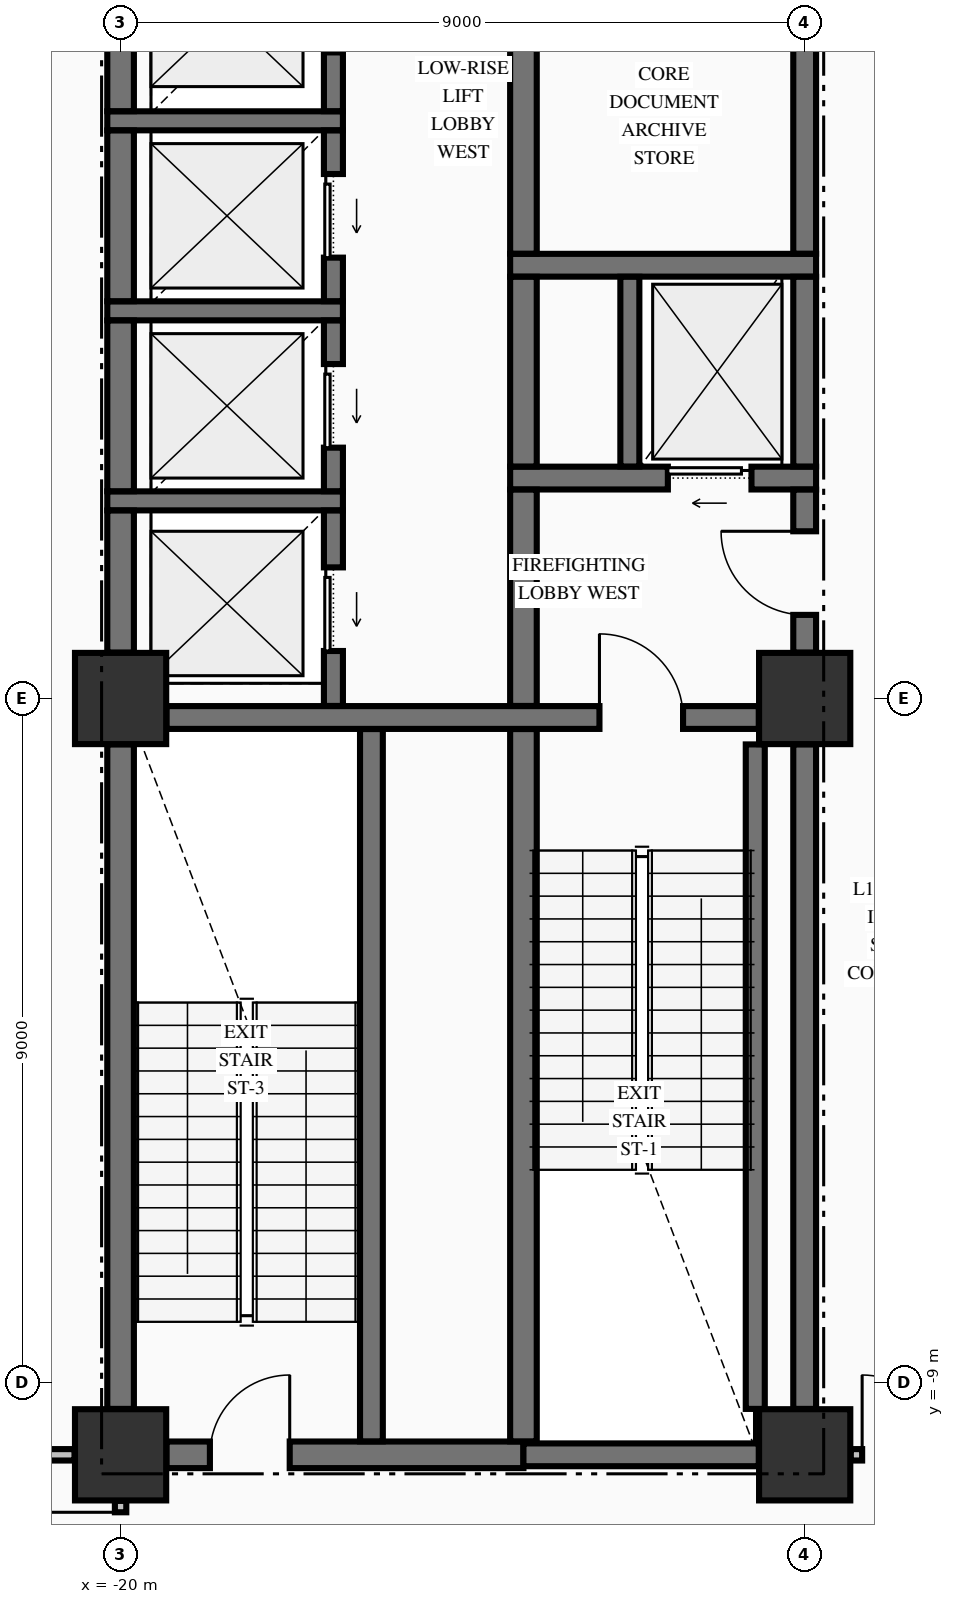
"""IFC4 building model, lengths in metres.
Left out: names, types, materials, properties, quantities, classifications, styles, units other than length and angle.
Written with IfcOpenShell. Run it as: python <this file> out.ifc"""

import sys

from ifc_helpers import new_model, si_unit, direction, frame, frame_2d, origin, origin_2d, place, context, subcontext, project, spatial, rectangle, extrude, element, fill, save


model = new_model("IFC4")
c1 = context("Model", 3, precision=1e-05, world=origin(), true_north=direction((0.0, 1.0)))
c2 = subcontext(c1, "Body", "Model", "MODEL_VIEW")
j1 = project(units=[si_unit("LENGTHUNIT", "METRE"), si_unit("PLANEANGLEUNIT", "RADIAN")], contexts=[c1])
p1 = place(None, origin())
s1 = spatial("IfcSite", under=j1, at=p1, CompositionType="ELEMENT")
p2 = place(p1, origin())
s2 = spatial("IfcBuilding", under=s1, at=p2, CompositionType="ELEMENT")
p3 = place(p2, frame((0.0, 0.0, 52.19)))
s3 = spatial("IfcBuildingStorey", under=s2, at=p3, CompositionType="ELEMENT", Elevation=52.19)
for number, where, z_axis, x_axis in (
    (1, (-20.0, -9.95, -0.425), (0.0, 0.0, 1.0), (1.0, 0.0, 0.0)),
    (2, (-11.0, -9.95, -0.425), (0.0, 0.0, 1.0), (1.0, 0.0, 0.0)),
    (3, (-11.0, 0.0, -0.425), (0.0, 0.0, 1.0), (1.0, 0.0, 0.0)),
    (4, (-20.0, 0.0, -0.425), (0.0, 0.0, 1.0), (1.0, 0.0, 0.0)),
):
    element("IfcColumn", number, at=place(p3, frame(where, z_axis=z_axis, x_axis=x_axis)), inside=s3, PredefinedType="COLUMN", context=c2, shape_type="SweptSolid", body=[
        extrude(rectangle(XDim=1.2, YDim=1.2, at=origin_2d()), origin(), (0.0, 0.0, 1.0), 5.0),
    ])
p4 = place(p3, frame((-19.396, -9.95, 0.0), z_axis=(0.0, 0.0, 1.0), x_axis=(1.0, 0.0, 0.0)))
e5 = element("IfcWall", 5, at=p4, inside=s3, PredefinedType="SHEAR", context=c2, shape_type="SweptSolid", body=[
    extrude(rectangle(XDim=4.696, YDim=0.35, at=frame_2d((2.348, 0.0))), origin(), (0.0, 0.0, 1.0), 4.575),
])
p5 = place(p4, frame((0.571, 0.0, 0.0)))
e6 = element("IfcOpeningElement", 6, at=p5, cuts=e5, PredefinedType="OPENING", context=c2, shape_type="SweptSolid", body=[
    extrude(rectangle(XDim=1.05, YDim=2.15, at=frame_2d((0.525, 1.075))), frame((0.0, 0.185, 0.0), z_axis=(0.0, -1.0, 0.0), x_axis=(1.0, 0.0, 0.0)), (0.0, 0.0, 1.0), 0.37),
])
p6 = place(p3, frame((-14.7, -9.95, 0.0), z_axis=(0.0, 0.0, 1.0), x_axis=(1.0, 0.0, 0.0)))
e7 = element("IfcWall", 7, at=p6, inside=s3, PredefinedType="SHEAR", context=c2, shape_type="SweptSolid", body=[
    extrude(rectangle(XDim=3.096, YDim=0.3, at=frame_2d((1.548, 0.0))), origin(), (0.0, 0.0, 1.0), 4.575),
])
p7 = place(p3, frame((-19.396, -0.25, 0.0), z_axis=(0.0, 0.0, 1.0), x_axis=(1.0, 0.0, 0.0)))
e8 = element("IfcWall", 8, at=p7, inside=s3, PredefinedType="SHEAR", context=c2, shape_type="SweptSolid", body=[
    extrude(rectangle(XDim=7.792, YDim=0.3, at=frame_2d((3.896, 0.0))), origin(), (0.0, 0.0, 1.0), 4.575),
])
p8 = place(p7, frame((5.696, 0.0, 0.0)))
e9 = element("IfcOpeningElement", 9, at=p8, cuts=e8, PredefinedType="OPENING", context=c2, shape_type="SweptSolid", body=[
    extrude(rectangle(XDim=1.1, YDim=2.15, at=frame_2d((0.55, 1.075))), frame((0.0, 0.16, 0.0), z_axis=(0.0, -1.0, 0.0), x_axis=(1.0, 0.0, 0.0)), (0.0, 0.0, 1.0), 0.32),
])
p9 = place(p3, frame((-20.175, 2.6, 0.0), z_axis=(0.0, 0.0, 1.0), x_axis=(1.0, 0.0, 0.0)))
e10 = element("IfcWall", 10, at=p9, inside=s3, PredefinedType="SOLIDWALL", context=c2, shape_type="SweptSolid", body=[
    extrude(rectangle(XDim=3.1, YDim=0.25, at=frame_2d((1.55, 0.0))), origin(), (0.0, 0.0, 1.0), 4.575),
])
p10 = place(p3, frame((-14.875, 2.9, 0.0), z_axis=(0.0, 0.0, 1.0), x_axis=(1.0, 0.0, 0.0)))
e11 = element("IfcWall", 11, at=p10, inside=s3, PredefinedType="SHEAR", context=c2, shape_type="SweptSolid", body=[
    extrude(rectangle(XDim=4.025, YDim=0.3, at=frame_2d((2.012, 0.0))), origin(), (0.0, 0.0, 1.0), 4.575),
])
p11 = place(p10, frame((2.075, 0.0, 0.0)))
e12 = element("IfcOpeningElement", 12, at=p11, cuts=e11, PredefinedType="OPENING", context=c2, shape_type="SweptSolid", body=[
    extrude(rectangle(XDim=1.1, YDim=2.2, at=frame_2d((0.55, 1.1))), frame((0.0, 0.16, 0.0), z_axis=(0.0, -1.0, 0.0), x_axis=(1.0, 0.0, 0.0)), (0.0, 0.0, 1.0), 0.32),
])
p12 = place(p3, frame((-20.175, 5.1, 0.0), z_axis=(0.0, 0.0, 1.0), x_axis=(1.0, 0.0, 0.0)))
e13 = element("IfcWall", 13, at=p12, inside=s3, PredefinedType="SOLIDWALL", context=c2, shape_type="SweptSolid", body=[
    extrude(rectangle(XDim=3.1, YDim=0.25, at=frame_2d((1.55, 0.0))), origin(), (0.0, 0.0, 1.0), 4.575),
])
p13 = place(p3, frame((-14.875, 5.7, 0.0), z_axis=(0.0, 0.0, 1.0), x_axis=(1.0, 0.0, 0.0)))
e14 = element("IfcWall", 14, at=p13, inside=s3, PredefinedType="SHEAR", context=c2, shape_type="SweptSolid", body=[
    extrude(rectangle(XDim=4.025, YDim=0.3, at=frame_2d((2.012, 0.0))), origin(), (0.0, 0.0, 1.0), 4.575),
])
p14 = place(p3, frame((-20.175, 7.6, 0.0), z_axis=(0.0, 0.0, 1.0), x_axis=(1.0, 0.0, 0.0)))
e15 = element("IfcWall", 15, at=p14, inside=s3, PredefinedType="SOLIDWALL", context=c2, shape_type="SweptSolid", body=[
    extrude(rectangle(XDim=3.1, YDim=0.25, at=frame_2d((1.55, 0.0))), origin(), (0.0, 0.0, 1.0), 4.575),
])
p15 = place(p3, frame((-23.835, -9.95, 0.0), z_axis=(0.0, 0.0, 1.0), x_axis=(1.0, 0.0, 0.0)))
e16 = element("IfcWall", 16, at=p15, inside=s3, PredefinedType="PARTITIONING", context=c2, shape_type="SweptSolid", body=[
    extrude(rectangle(XDim=3.229, YDim=0.15, at=frame_2d((1.615, 0.0))), origin(), (0.0, 0.0, 1.0), 4.575),
])
p16 = place(p15, frame((1.335, 0.0, 0.0)))
e17 = element("IfcOpeningElement", 17, at=p16, cuts=e16, PredefinedType="OPENING", context=c2, shape_type="SweptSolid", body=[
    extrude(rectangle(XDim=1.0, YDim=2.15, at=frame_2d((0.5, 1.075))), frame((0.0, 0.085, 0.0), z_axis=(0.0, -1.0, 0.0), x_axis=(1.0, 0.0, 0.0)), (0.0, 0.0, 1.0), 0.17),
])
p17 = place(p3, frame((-10.394, -9.95, 0.0), z_axis=(0.0, 0.0, 1.0), x_axis=(1.0, 0.0, 0.0)))
e18 = element("IfcWall", 18, at=p17, inside=s3, PredefinedType="PARTITIONING", context=c2, shape_type="SweptSolid", body=[
    extrude(rectangle(XDim=20.788, YDim=0.15, at=frame_2d((10.394, 0.0))), origin(), (0.0, 0.0, 1.0), 4.575),
])
p18 = place(p17, frame((0.15, 0.0, 0.0)))
e19 = element("IfcOpeningElement", 19, at=p18, cuts=e18, PredefinedType="OPENING", context=c2, shape_type="SweptSolid", body=[
    extrude(rectangle(XDim=1.05, YDim=2.15, at=frame_2d((0.525, 1.075))), frame((0.0, 0.085, 0.0), z_axis=(0.0, -1.0, 0.0), x_axis=(1.0, 0.0, 0.0)), (0.0, 0.0, 1.0), 0.17),
])
p19 = place(p17, frame((19.588, 0.0, 0.0)))
e20 = element("IfcOpeningElement", 20, at=p19, cuts=e18, PredefinedType="OPENING", context=c2, shape_type="SweptSolid", body=[
    extrude(rectangle(XDim=1.05, YDim=2.15, at=frame_2d((0.525, 1.075))), frame((0.0, 0.085, 0.0), z_axis=(0.0, -1.0, 0.0), x_axis=(1.0, 0.0, 0.0)), (0.0, 0.0, 1.0), 0.17),
])
p20 = place(p17, frame((12.669, 0.0, 0.0)))
e21 = element("IfcOpeningElement", 21, at=p20, cuts=e18, PredefinedType="OPENING", context=c2, shape_type="SweptSolid", body=[
    extrude(rectangle(XDim=0.95, YDim=2.15, at=frame_2d((0.475, 1.075))), frame((0.0, 0.085, 0.0), z_axis=(0.0, -1.0, 0.0), x_axis=(1.0, 0.0, 0.0)), (0.0, 0.0, 1.0), 0.17),
])
p21 = place(p3, frame((-20.0, -9.346, 0.0), z_axis=(0.0, 0.0, 1.0), x_axis=(0.0, 1.0, 0.0)))
e22 = element("IfcWall", 22, at=p21, inside=s3, PredefinedType="SHEAR", context=c2, shape_type="SweptSolid", body=[
    extrude(rectangle(XDim=8.742, YDim=0.35, at=frame_2d((4.371, 0.0))), origin(), (0.0, 0.0, 1.0), 4.575),
])
p22 = place(p3, frame((-20.0, 0.604, 0.0), z_axis=(0.0, 0.0, 1.0), x_axis=(0.0, 1.0, 0.0)))
e23 = element("IfcWall", 23, at=p22, inside=s3, PredefinedType="SHEAR", context=c2, shape_type="SweptSolid", body=[
    extrude(rectangle(XDim=1.869, YDim=0.35, at=frame_2d((0.935, 0.0))), origin(), (0.0, 0.0, 1.0), 4.575),
])
for number, where, z_axis, x_axis in (
    (24, (-20.0, 2.727, 0.0), (0.0, 0.0, 1.0), (0.0, 1.0, 0.0)),
    (25, (-20.0, 5.227, 0.0), (0.0, 0.0, 1.0), (0.0, 1.0, 0.0)),
):
    element("IfcWall", number, at=place(p3, frame(where, z_axis=z_axis, x_axis=x_axis)), inside=s3, PredefinedType="SHEAR", context=c2, shape_type="SweptSolid", body=[
        extrude(rectangle(XDim=2.246, YDim=0.35, at=frame_2d((1.123, 0.0))), origin(), (0.0, 0.0, 1.0), 4.575),
    ])
p23 = place(p3, frame((-20.0, 7.727, 0.0), z_axis=(0.0, 0.0, 1.0), x_axis=(0.0, 1.0, 0.0)))
e26 = element("IfcWall", 26, at=p23, inside=s3, PredefinedType="SHEAR", context=c2, shape_type="SweptSolid", body=[
    extrude(rectangle(XDim=2.169, YDim=0.35, at=frame_2d((1.084, 0.0))), origin(), (0.0, 0.0, 1.0), 4.575),
])
p24 = place(p3, frame((-17.2, -0.098, 0.0), z_axis=(0.0, 0.0, 1.0), x_axis=(0.0, 1.0, 0.0)))
e27 = element("IfcWall", 27, at=p24, inside=s3, PredefinedType="SOLIDWALL", context=c2, shape_type="SweptSolid", body=[
    extrude(rectangle(XDim=2.571, YDim=0.25, at=frame_2d((1.285, 0.0))), origin(), (0.0, 0.0, 1.0), 4.575),
])
p25 = place(p24, frame((0.723, 0.0, 0.0)))
e28 = element("IfcOpeningElement", 28, at=p25, cuts=e27, PredefinedType="OPENING", context=c2, shape_type="SweptSolid", body=[
    extrude(rectangle(XDim=1.1, YDim=2.2, at=frame_2d((0.55, 1.1))), frame((0.0, 0.135, 0.0), z_axis=(0.0, -1.0, 0.0), x_axis=(1.0, 0.0, 0.0)), (0.0, 0.0, 1.0), 0.27),
])
p26 = place(p3, frame((-17.2, 2.727, 0.0), z_axis=(0.0, 0.0, 1.0), x_axis=(0.0, 1.0, 0.0)))
e29 = element("IfcWall", 29, at=p26, inside=s3, PredefinedType="SOLIDWALL", context=c2, shape_type="SweptSolid", body=[
    extrude(rectangle(XDim=2.246, YDim=0.25, at=frame_2d((1.123, 0.0))), origin(), (0.0, 0.0, 1.0), 4.575),
])
p27 = place(p26, frame((0.573, 0.0, 0.0)))
e30 = element("IfcOpeningElement", 30, at=p27, cuts=e29, PredefinedType="OPENING", context=c2, shape_type="SweptSolid", body=[
    extrude(rectangle(XDim=1.1, YDim=2.2, at=frame_2d((0.55, 1.1))), frame((0.0, 0.135, 0.0), z_axis=(0.0, -1.0, 0.0), x_axis=(1.0, 0.0, 0.0)), (0.0, 0.0, 1.0), 0.27),
])
p28 = place(p3, frame((-17.2, 5.227, 0.0), z_axis=(0.0, 0.0, 1.0), x_axis=(0.0, 1.0, 0.0)))
e31 = element("IfcWall", 31, at=p28, inside=s3, PredefinedType="SOLIDWALL", context=c2, shape_type="SweptSolid", body=[
    extrude(rectangle(XDim=2.246, YDim=0.25, at=frame_2d((1.123, 0.0))), origin(), (0.0, 0.0, 1.0), 4.575),
])
p29 = place(p28, frame((0.573, 0.0, 0.0)))
e32 = element("IfcOpeningElement", 32, at=p29, cuts=e31, PredefinedType="OPENING", context=c2, shape_type="SweptSolid", body=[
    extrude(rectangle(XDim=1.1, YDim=2.2, at=frame_2d((0.55, 1.1))), frame((0.0, 0.135, 0.0), z_axis=(0.0, -1.0, 0.0), x_axis=(1.0, 0.0, 0.0)), (0.0, 0.0, 1.0), 0.27),
])
p30 = place(p3, frame((-17.2, 7.727, 0.0), z_axis=(0.0, 0.0, 1.0), x_axis=(0.0, 1.0, 0.0)))
e33 = element("IfcWall", 33, at=p30, inside=s3, PredefinedType="SOLIDWALL", context=c2, shape_type="SweptSolid", body=[
    extrude(rectangle(XDim=2.596, YDim=0.25, at=frame_2d((1.298, 0.0))), origin(), (0.0, 0.0, 1.0), 4.575),
])
p31 = place(p30, frame((0.773, 0.0, 0.0)))
e34 = element("IfcOpeningElement", 34, at=p31, cuts=e33, PredefinedType="OPENING", context=c2, shape_type="SweptSolid", body=[
    extrude(rectangle(XDim=1.1, YDim=2.2, at=frame_2d((0.55, 1.1))), frame((0.0, 0.135, 0.0), z_axis=(0.0, -1.0, 0.0), x_axis=(1.0, 0.0, 0.0)), (0.0, 0.0, 1.0), 0.27),
])
p32 = place(p3, frame((-16.7, -9.773, 0.0), z_axis=(0.0, 0.0, 1.0), x_axis=(0.0, 1.0, 0.0)))
e35 = element("IfcWall", 35, at=p32, inside=s3, PredefinedType="SHEAR", context=c2, shape_type="SweptSolid", body=[
    extrude(rectangle(XDim=9.371, YDim=0.3, at=frame_2d((4.686, 0.0))), origin(), (0.0, 0.0, 1.0), 4.575),
])
p33 = place(p3, frame((-14.7, -9.773, 0.0), z_axis=(0.0, 0.0, 1.0), x_axis=(0.0, 1.0, 0.0)))
e36 = element("IfcWall", 36, at=p33, inside=s3, PredefinedType="SHEAR", context=c2, shape_type="SweptSolid", body=[
    extrude(rectangle(XDim=9.371, YDim=0.35, at=frame_2d((4.686, 0.0))), origin(), (0.0, 0.0, 1.0), 4.575),
])
p34 = place(p3, frame((-14.7, -0.098, 0.0), z_axis=(0.0, 0.0, 1.0), x_axis=(0.0, 1.0, 0.0)))
e37 = element("IfcWall", 37, at=p34, inside=s3, PredefinedType="SHEAR", context=c2, shape_type="SweptSolid", body=[
    extrude(rectangle(XDim=2.846, YDim=0.35, at=frame_2d((1.423, 0.0))), origin(), (0.0, 0.0, 1.0), 4.575),
])
p35 = place(p3, frame((-14.7, 3.052, 0.0), z_axis=(0.0, 0.0, 1.0), x_axis=(0.0, 1.0, 0.0)))
e38 = element("IfcWall", 38, at=p35, inside=s3, PredefinedType="SHEAR", context=c2, shape_type="SweptSolid", body=[
    extrude(rectangle(XDim=2.496, YDim=0.35, at=frame_2d((1.248, 0.0))), origin(), (0.0, 0.0, 1.0), 4.575),
])
p36 = place(p3, frame((-14.7, 5.852, 0.0), z_axis=(0.0, 0.0, 1.0), x_axis=(0.0, 1.0, 0.0)))
e39 = element("IfcWall", 39, at=p36, inside=s3, PredefinedType="SHEAR", context=c2, shape_type="SweptSolid", body=[
    extrude(rectangle(XDim=4.471, YDim=0.35, at=frame_2d((2.235, 0.0))), origin(), (0.0, 0.0, 1.0), 4.575),
])
p37 = place(p3, frame((-13.3, 3.052, 0.0), z_axis=(0.0, 0.0, 1.0), x_axis=(0.0, 1.0, 0.0)))
e40 = element("IfcWall", 40, at=p37, inside=s3, PredefinedType="SOLIDWALL", context=c2, shape_type="SweptSolid", body=[
    extrude(rectangle(XDim=2.496, YDim=0.25, at=frame_2d((1.248, 0.0))), origin(), (0.0, 0.0, 1.0), 4.575),
])
p38 = place(p3, frame((-11.65, -9.346, 0.0), z_axis=(0.0, 0.0, 1.0), x_axis=(0.0, 1.0, 0.0)))
e41 = element("IfcWall", 41, at=p38, inside=s3, PredefinedType="SOLIDWALL", context=c2, shape_type="SweptSolid", body=[
    extrude(rectangle(XDim=8.742, YDim=0.25, at=frame_2d((4.371, 0.0))), origin(), (0.0, 0.0, 1.0), 4.575),
])
p39 = place(p3, frame((-11.0, -9.346, 0.0), z_axis=(0.0, 0.0, 1.0), x_axis=(0.0, 1.0, 0.0)))
e42 = element("IfcWall", 42, at=p39, inside=s3, PredefinedType="SHEAR", context=c2, shape_type="SweptSolid", body=[
    extrude(rectangle(XDim=8.742, YDim=0.3, at=frame_2d((4.371, 0.0))), origin(), (0.0, 0.0, 1.0), 4.575),
])
p40 = place(p3, frame((-11.0, 0.604, 0.0), z_axis=(0.0, 0.0, 1.0), x_axis=(0.0, 1.0, 0.0)))
e43 = element("IfcWall", 43, at=p40, inside=s3, PredefinedType="SHEAR", context=c2, shape_type="SweptSolid", body=[
    extrude(rectangle(XDim=2.144, YDim=0.3, at=frame_2d((1.072, 0.0))), origin(), (0.0, 0.0, 1.0), 4.575),
])
p41 = place(p40, frame((0.496, 0.0, 0.0)))
e44 = element("IfcOpeningElement", 44, at=p41, cuts=e43, PredefinedType="OPENING", context=c2, shape_type="SweptSolid", body=[
    extrude(rectangle(XDim=1.1, YDim=2.15, at=frame_2d((0.55, 1.075))), frame((0.0, 0.16, 0.0), z_axis=(0.0, -1.0, 0.0), x_axis=(1.0, 0.0, 0.0)), (0.0, 0.0, 1.0), 0.32),
])
p42 = place(p3, frame((-11.0, 3.052, 0.0), z_axis=(0.0, 0.0, 1.0), x_axis=(0.0, 1.0, 0.0)))
e45 = element("IfcWall", 45, at=p42, inside=s3, PredefinedType="SHEAR", context=c2, shape_type="SweptSolid", body=[
    extrude(rectangle(XDim=2.496, YDim=0.3, at=frame_2d((1.248, 0.0))), origin(), (0.0, 0.0, 1.0), 4.575),
])
p43 = place(p3, frame((-11.0, 5.852, 0.0), z_axis=(0.0, 0.0, 1.0), x_axis=(0.0, 1.0, 0.0)))
e46 = element("IfcWall", 46, at=p43, inside=s3, PredefinedType="SHEAR", context=c2, shape_type="SweptSolid", body=[
    extrude(rectangle(XDim=4.044, YDim=0.3, at=frame_2d((2.022, 0.0))), origin(), (0.0, 0.0, 1.0), 4.575),
])
p44 = place(p3, frame((-20.0, -12.222, 0.0), z_axis=(0.0, 0.0, 1.0), x_axis=(0.0, 1.0, 0.0)))
e47 = element("IfcWall", 47, at=p44, inside=s3, PredefinedType="PARTITIONING", context=c2, shape_type="SweptSolid", body=[
    extrude(rectangle(XDim=1.666, YDim=0.15, at=frame_2d((0.833, 0.0))), origin(), (0.0, 0.0, 1.0), 4.575),
])
p45 = place(p44, frame((0.566, 0.0, 0.0)))
e48 = element("IfcOpeningElement", 48, at=p45, cuts=e47, PredefinedType="OPENING", context=c2, shape_type="SweptSolid", body=[
    extrude(rectangle(XDim=0.95, YDim=2.02, at=frame_2d((0.475, 1.01))), frame((0.0, 0.085, 0.0), z_axis=(0.0, -1.0, 0.0), x_axis=(1.0, 0.0, 0.0)), (0.0, 0.0, 1.0), 0.17),
])
p46 = place(p8, origin())
e49 = element("IfcDoor", 49, at=p46, inside=s3, OperationType="SINGLE_SWING_LEFT", PredefinedType="DOOR", context=c2, shape_type="SweptSolid", body=[
    extrude(rectangle(XDim=1.1, YDim=2.15, at=frame_2d((0.55, 1.075))), frame((0.0, 0.025, 0.0), z_axis=(0.0, -1.0, 0.0), x_axis=(1.0, 0.0, 0.0)), (0.0, 0.0, 1.0), 0.05),
])
fill(e9, e49)
p47 = place(p41, origin())
e50 = element("IfcDoor", 50, at=p47, inside=s3, OperationType="SINGLE_SWING_RIGHT", PredefinedType="DOOR", context=c2, shape_type="SweptSolid", body=[
    extrude(rectangle(XDim=1.1, YDim=2.15, at=frame_2d((0.55, 1.075))), frame((0.0, 0.025, 0.0), z_axis=(0.0, -1.0, 0.0), x_axis=(1.0, 0.0, 0.0)), (0.0, 0.0, 1.0), 0.05),
])
fill(e44, e50)
p48 = place(p11, origin())
e51 = element("IfcDoor", 51, at=p48, inside=s3, OperationType="SLIDING_TO_LEFT", PredefinedType="DOOR", context=c2, shape_type="SweptSolid", body=[
    extrude(rectangle(XDim=1.1, YDim=2.2, at=frame_2d((0.55, 1.1))), frame((0.0, 0.025, 0.0), z_axis=(0.0, -1.0, 0.0), x_axis=(1.0, 0.0, 0.0)), (0.0, 0.0, 1.0), 0.05),
])
fill(e12, e51)
p49 = place(p5, origin())
e52 = element("IfcDoor", 52, at=p49, inside=s3, OperationType="SINGLE_SWING_RIGHT", PredefinedType="DOOR", context=c2, shape_type="SweptSolid", body=[
    extrude(rectangle(XDim=1.05, YDim=2.15, at=frame_2d((0.525, 1.075))), frame((0.0, 0.025, 0.0), z_axis=(0.0, -1.0, 0.0), x_axis=(1.0, 0.0, 0.0)), (0.0, 0.0, 1.0), 0.05),
])
fill(e6, e52)
p50 = place(p25, origin())
e53 = element("IfcDoor", 53, at=p50, inside=s3, OperationType="SLIDING_TO_LEFT", PredefinedType="DOOR", context=c2, shape_type="SweptSolid", body=[
    extrude(rectangle(XDim=1.1, YDim=2.2, at=frame_2d((0.55, 1.1))), frame((0.0, 0.025, 0.0), z_axis=(0.0, -1.0, 0.0), x_axis=(1.0, 0.0, 0.0)), (0.0, 0.0, 1.0), 0.05),
])
fill(e28, e53)
p51 = place(p27, origin())
e54 = element("IfcDoor", 54, at=p51, inside=s3, OperationType="SLIDING_TO_LEFT", PredefinedType="DOOR", context=c2, shape_type="SweptSolid", body=[
    extrude(rectangle(XDim=1.1, YDim=2.2, at=frame_2d((0.55, 1.1))), frame((0.0, 0.025, 0.0), z_axis=(0.0, -1.0, 0.0), x_axis=(1.0, 0.0, 0.0)), (0.0, 0.0, 1.0), 0.05),
])
fill(e30, e54)
p52 = place(p29, origin())
e55 = element("IfcDoor", 55, at=p52, inside=s3, OperationType="SLIDING_TO_LEFT", PredefinedType="DOOR", context=c2, shape_type="SweptSolid", body=[
    extrude(rectangle(XDim=1.1, YDim=2.2, at=frame_2d((0.55, 1.1))), frame((0.0, 0.025, 0.0), z_axis=(0.0, -1.0, 0.0), x_axis=(1.0, 0.0, 0.0)), (0.0, 0.0, 1.0), 0.05),
])
fill(e32, e55)
p53 = place(p18, origin())
e56 = element("IfcDoor", 56, at=p53, inside=s3, OperationType="SINGLE_SWING_LEFT", PredefinedType="DOOR", context=c2, shape_type="SweptSolid", body=[
    extrude(rectangle(XDim=1.05, YDim=2.15, at=frame_2d((0.525, 1.075))), frame((0.0, 0.025, 0.0), z_axis=(0.0, -1.0, 0.0), x_axis=(1.0, 0.0, 0.0)), (0.0, 0.0, 1.0), 0.05),
])
fill(e19, e56)
p54 = place(p45, origin())
e57 = element("IfcDoor", 57, at=p54, inside=s3, OperationType="SINGLE_SWING_RIGHT", PredefinedType="DOOR", context=c2, shape_type="SweptSolid", body=[
    extrude(rectangle(XDim=0.95, YDim=2.02, at=frame_2d((0.475, 1.01))), frame((0.0, 0.025, 0.0), z_axis=(0.0, -1.0, 0.0), x_axis=(1.0, 0.0, 0.0)), (0.0, 0.0, 1.0), 0.05),
])
fill(e48, e57)
save(model, sys.argv[1])
